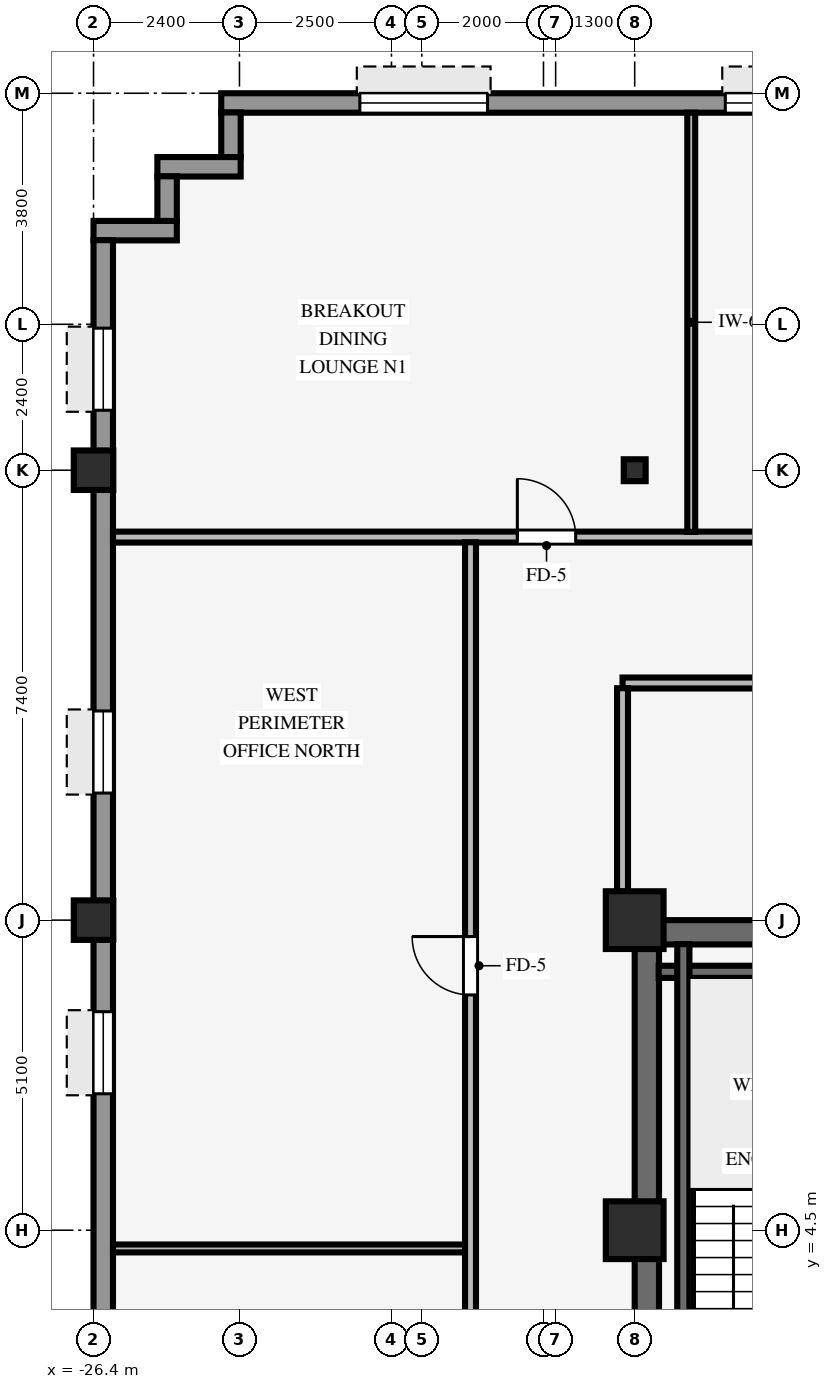
"""IFC4 building model, lengths in metres.
Left out: names, types, materials, properties, quantities, classifications, styles, units other than length and angle.
Written with IfcOpenShell. Run it as: python <this file> out.ifc"""

import sys

from ifc_helpers import new_model, si_unit, direction, frame, frame_2d, origin, origin_2d, place, context, subcontext, project, spatial, rectangle, hollow_rectangle, i_section, extrude, source, transform, mapped, element, fill, save


model = new_model("IFC4")
c1 = context("Model", 3, precision=1e-05, world=origin(), true_north=direction((0.0, 1.0)))
c2 = subcontext(c1, "Body", "Model", "MODEL_VIEW")
j1 = project(units=[si_unit("LENGTHUNIT", "METRE"), si_unit("PLANEANGLEUNIT", "RADIAN")], contexts=[c1])
p1 = place(None, origin())
s1 = spatial("IfcSite", under=j1, at=p1, CompositionType="ELEMENT")
p2 = place(p1, origin())
s2 = spatial("IfcBuilding", under=s1, at=p2, CompositionType="ELEMENT")
p3 = place(p2, frame((0.0, 0.0, 142.1)))
s3 = spatial("IfcBuildingStorey", under=s2, at=p3, CompositionType="ELEMENT", Elevation=142.1)
p4 = place(p3, frame((-17.5, 9.4, 0.0), z_axis=(0.0, 0.0, 1.0), x_axis=(1.0, 0.0, 0.0)))
e1 = element("IfcWall", 1, at=p4, inside=s3, PredefinedType="SHEAR", context=c2, shape_type="SweptSolid", body=[
    extrude(rectangle(XDim=8.5, YDim=0.4, at=frame_2d((4.25, 0.0))), origin(), (0.0, 0.0, 1.0), 3.37),
])
p5 = place(p3, frame((-17.3, -9.205, 0.0), z_axis=(0.0, 0.0, 1.0), x_axis=(0.0, 1.0, 0.0)))
e2 = element("IfcWall", 2, at=p5, inside=s3, PredefinedType="SHEAR", context=c2, shape_type="SweptSolid", body=[
    extrude(rectangle(XDim=18.41, YDim=0.4, at=frame_2d((9.205, 0.0))), origin(), (0.0, 0.0, 1.0), 3.37),
])
for number, where, z_axis, x_axis in (
    (3, (-17.5, 4.5, 0.0), (0.0, 0.0, 1.0), (1.0, 0.0, 0.0)),
    (4, (-17.5, 9.6, 0.0), (0.0, 0.0, 1.0), (1.0, 0.0, 0.0)),
):
    element("IfcColumn", number, at=place(p3, frame(where, z_axis=z_axis, x_axis=x_axis)), inside=s3, PredefinedType="COLUMN", context=c2, shape_type="SweptSolid", body=[
        extrude(rectangle(XDim=0.95, YDim=0.95, at=origin_2d()), origin(), (0.0, 0.0, 1.0), 3.37),
    ])
for number, where, z_axis, x_axis in (
    (5, (-26.4, 9.6, 0.0), (0.0, 0.0, 1.0), (1.0, 0.0, 0.0)),
    (6, (-26.4, 17.0, 0.0), (0.0, 0.0, 1.0), (1.0, 0.0, 0.0)),
):
    element("IfcColumn", number, at=place(p3, frame(where, z_axis=z_axis, x_axis=x_axis)), inside=s3, PredefinedType="COLUMN", context=c2, shape_type="SweptSolid", body=[
        extrude(hollow_rectangle(XDim=0.65, YDim=0.65, WallThickness=0.04, InnerFilletRadius=0.04, OuterFilletRadius=0.08, at=origin_2d()), origin(), (0.0, 0.0, 1.0), 3.37),
    ])
p6 = place(p3, frame((-17.5, 17.0, 0.0), z_axis=(0.0, 0.0, 1.0), x_axis=(1.0, 0.0, 0.0)))
e7 = element("IfcColumn", 7, at=p6, inside=s3, PredefinedType="COLUMN", context=c2, shape_type="SweptSolid", body=[
    extrude(i_section(OverallWidth=0.36, OverallDepth=0.36, WebThickness=0.021, FlangeThickness=0.021, FilletRadius=0.018, at=origin_2d()), origin(), (0.0, 0.0, 1.0), 3.37),
])
p7 = place(p3, frame((-24.3, 23.04, 0.0), z_axis=(0.0, 0.0, 1.0), x_axis=(1.0, 0.0, 0.0)))
e8 = element("IfcWall", 8, at=p7, inside=s3, PredefinedType="STANDARD", context=c2, shape_type="SweptSolid", body=[
    extrude(rectangle(XDim=48.6, YDim=0.32, at=frame_2d((24.3, 0.0))), origin(), (0.0, 0.0, 1.0), 2.705),
])
p8 = place(p7, frame((28.5, 0.0, 0.0)))
e9 = element("IfcOpeningElement", 9, at=p8, cuts=e8, PredefinedType="OPENING", context=c2, shape_type="SweptSolid", body=[
    extrude(rectangle(XDim=1.05, YDim=2.1, at=frame_2d((0.525, 1.05))), frame((0.0, 0.17, 0.0), z_axis=(0.0, -1.0, 0.0), x_axis=(1.0, 0.0, 0.0)), (0.0, 0.0, 1.0), 0.34),
])
p9 = place(p7, frame((2.28, 0.0, 0.8)))
e10 = element("IfcOpeningElement", 10, at=p9, cuts=e8, PredefinedType="OPENING", context=c2, shape_type="SweptSolid", body=[
    extrude(rectangle(XDim=2.1, YDim=1.56, at=frame_2d((1.05, 0.78))), frame((0.0, 0.17, 0.0), z_axis=(0.0, -1.0, 0.0), x_axis=(1.0, 0.0, 0.0)), (0.0, 0.0, 1.0), 0.34),
])
p10 = place(p7, frame((8.29, 0.0, 0.8)))
e11 = element("IfcOpeningElement", 11, at=p10, cuts=e8, PredefinedType="OPENING", context=c2, shape_type="SweptSolid", body=[
    extrude(rectangle(XDim=2.1, YDim=1.56, at=frame_2d((1.05, 0.78))), frame((0.0, 0.17, 0.0), z_axis=(0.0, -1.0, 0.0), x_axis=(1.0, 0.0, 0.0)), (0.0, 0.0, 1.0), 0.34),
])
p11 = place(p7, frame((11.6, 0.0, 0.8)))
e12 = element("IfcOpeningElement", 12, at=p11, cuts=e8, PredefinedType="OPENING", context=c2, shape_type="SweptSolid", body=[
    extrude(rectangle(XDim=2.1, YDim=1.56, at=frame_2d((1.05, 0.78))), frame((0.0, 0.17, 0.0), z_axis=(0.0, -1.0, 0.0), x_axis=(1.0, 0.0, 0.0)), (0.0, 0.0, 1.0), 0.34),
])
p12 = place(p7, frame((16.26, 0.0, 0.8)))
e13 = element("IfcOpeningElement", 13, at=p12, cuts=e8, PredefinedType="OPENING", context=c2, shape_type="SweptSolid", body=[
    extrude(rectangle(XDim=2.1, YDim=1.56, at=frame_2d((1.05, 0.78))), frame((0.0, 0.17, 0.0), z_axis=(0.0, -1.0, 0.0), x_axis=(1.0, 0.0, 0.0)), (0.0, 0.0, 1.0), 0.34),
])
p13 = place(p7, frame((25.58, 0.0, 0.8)))
e14 = element("IfcOpeningElement", 14, at=p13, cuts=e8, PredefinedType="OPENING", context=c2, shape_type="SweptSolid", body=[
    extrude(rectangle(XDim=2.1, YDim=1.56, at=frame_2d((1.05, 0.78))), frame((0.0, 0.17, 0.0), z_axis=(0.0, -1.0, 0.0), x_axis=(1.0, 0.0, 0.0)), (0.0, 0.0, 1.0), 0.34),
])
p14 = place(p7, frame((30.24, 0.0, 0.8)))
e15 = element("IfcOpeningElement", 15, at=p14, cuts=e8, PredefinedType="OPENING", context=c2, shape_type="SweptSolid", body=[
    extrude(rectangle(XDim=2.1, YDim=1.56, at=frame_2d((1.05, 0.78))), frame((0.0, 0.17, 0.0), z_axis=(0.0, -1.0, 0.0), x_axis=(1.0, 0.0, 0.0)), (0.0, 0.0, 1.0), 0.34),
])
p15 = place(p7, frame((34.9, 0.0, 0.8)))
e16 = element("IfcOpeningElement", 16, at=p15, cuts=e8, PredefinedType="OPENING", context=c2, shape_type="SweptSolid", body=[
    extrude(rectangle(XDim=2.1, YDim=1.56, at=frame_2d((1.05, 0.78))), frame((0.0, 0.17, 0.0), z_axis=(0.0, -1.0, 0.0), x_axis=(1.0, 0.0, 0.0)), (0.0, 0.0, 1.0), 0.34),
])
p16 = place(p7, frame((39.56, 0.0, 0.8)))
e17 = element("IfcOpeningElement", 17, at=p16, cuts=e8, PredefinedType="OPENING", context=c2, shape_type="SweptSolid", body=[
    extrude(rectangle(XDim=2.1, YDim=1.56, at=frame_2d((1.05, 0.78))), frame((0.0, 0.17, 0.0), z_axis=(0.0, -1.0, 0.0), x_axis=(1.0, 0.0, 0.0)), (0.0, 0.0, 1.0), 0.34),
])
p17 = place(p7, frame((44.22, 0.0, 0.8)))
e18 = element("IfcOpeningElement", 18, at=p17, cuts=e8, PredefinedType="OPENING", context=c2, shape_type="SweptSolid", body=[
    extrude(rectangle(XDim=2.1, YDim=1.56, at=frame_2d((1.05, 0.78))), frame((0.0, 0.17, 0.0), z_axis=(0.0, -1.0, 0.0), x_axis=(1.0, 0.0, 0.0)), (0.0, 0.0, 1.0), 0.34),
])
p18 = place(p3, frame((-24.14, 22.146, 0.0), z_axis=(0.0, 0.0, 1.0), x_axis=(0.0, 1.0, 0.0)))
e19 = element("IfcWall", 19, at=p18, inside=s3, PredefinedType="STANDARD", context=c2, shape_type="SweptSolid", body=[
    extrude(rectangle(XDim=0.738, YDim=0.32, at=frame_2d((0.369, 0.0))), origin(), (0.0, 0.0, 1.0), 3.36),
])
p19 = place(p3, frame((-25.35, 21.99, 0.0), z_axis=(0.0, 0.0, 1.0), x_axis=(1.0, 0.0, 0.0)))
e20 = element("IfcWall", 20, at=p19, inside=s3, PredefinedType="STANDARD", context=c2, shape_type="SweptSolid", body=[
    extrude(rectangle(XDim=1.37, YDim=0.32, at=frame_2d((0.685, 0.0))), origin(), (0.0, 0.0, 1.0), 3.36),
])
p20 = place(p3, frame((-25.19, 21.096, 0.0), z_axis=(0.0, 0.0, 1.0), x_axis=(0.0, 1.0, 0.0)))
e21 = element("IfcWall", 21, at=p20, inside=s3, PredefinedType="STANDARD", context=c2, shape_type="SweptSolid", body=[
    extrude(rectangle(XDim=0.738, YDim=0.32, at=frame_2d((0.369, 0.0))), origin(), (0.0, 0.0, 1.0), 3.36),
])
p21 = place(p3, frame((-26.4, 20.94, 0.0), z_axis=(0.0, 0.0, 1.0), x_axis=(1.0, 0.0, 0.0)))
e22 = element("IfcWall", 22, at=p21, inside=s3, PredefinedType="STANDARD", context=c2, shape_type="SweptSolid", body=[
    extrude(rectangle(XDim=1.37, YDim=0.32, at=frame_2d((0.685, 0.0))), origin(), (0.0, 0.0, 1.0), 3.36),
])
p22 = place(p3, frame((-26.24, -20.784, 0.0), z_axis=(0.0, 0.0, 1.0), x_axis=(0.0, 1.0, 0.0)))
e23 = element("IfcWall", 23, at=p22, inside=s3, PredefinedType="STANDARD", context=c2, shape_type="SweptSolid", body=[
    extrude(rectangle(XDim=41.568, YDim=0.32, at=frame_2d((20.784, 0.0))), origin(), (0.0, 0.0, 1.0), 2.705),
])
p23 = place(p22, frame((1.448, 0.0, 0.8)))
e24 = element("IfcOpeningElement", 24, at=p23, cuts=e23, PredefinedType="OPENING", context=c2, shape_type="SweptSolid", body=[
    extrude(rectangle(XDim=1.35, YDim=1.56, at=frame_2d((0.675, 0.78))), frame((0.0, 0.17, 0.0), z_axis=(0.0, -1.0, 0.0), x_axis=(1.0, 0.0, 0.0)), (0.0, 0.0, 1.0), 0.34),
])
p24 = place(p22, frame((7.744, 0.0, 0.8)))
e25 = element("IfcOpeningElement", 25, at=p24, cuts=e23, PredefinedType="OPENING", context=c2, shape_type="SweptSolid", body=[
    extrude(rectangle(XDim=1.35, YDim=1.56, at=frame_2d((0.675, 0.78))), frame((0.0, 0.17, 0.0), z_axis=(0.0, -1.0, 0.0), x_axis=(1.0, 0.0, 0.0)), (0.0, 0.0, 1.0), 0.34),
])
p25 = place(p22, frame((12.69, 0.0, 0.8)))
e26 = element("IfcOpeningElement", 26, at=p25, cuts=e23, PredefinedType="OPENING", context=c2, shape_type="SweptSolid", body=[
    extrude(rectangle(XDim=1.35, YDim=1.56, at=frame_2d((0.675, 0.78))), frame((0.0, 0.17, 0.0), z_axis=(0.0, -1.0, 0.0), x_axis=(1.0, 0.0, 0.0)), (0.0, 0.0, 1.0), 0.34),
])
p26 = place(p22, frame((17.636, 0.0, 0.8)))
e27 = element("IfcOpeningElement", 27, at=p26, cuts=e23, PredefinedType="OPENING", context=c2, shape_type="SweptSolid", body=[
    extrude(rectangle(XDim=1.35, YDim=1.56, at=frame_2d((0.675, 0.78))), frame((0.0, 0.17, 0.0), z_axis=(0.0, -1.0, 0.0), x_axis=(1.0, 0.0, 0.0)), (0.0, 0.0, 1.0), 0.34),
])
p27 = place(p22, frame((22.582, 0.0, 0.8)))
e28 = element("IfcOpeningElement", 28, at=p27, cuts=e23, PredefinedType="OPENING", context=c2, shape_type="SweptSolid", body=[
    extrude(rectangle(XDim=1.35, YDim=1.56, at=frame_2d((0.675, 0.78))), frame((0.0, 0.17, 0.0), z_axis=(0.0, -1.0, 0.0), x_axis=(1.0, 0.0, 0.0)), (0.0, 0.0, 1.0), 0.34),
])
p28 = place(p22, frame((27.528, 0.0, 0.8)))
e29 = element("IfcOpeningElement", 29, at=p28, cuts=e23, PredefinedType="OPENING", context=c2, shape_type="SweptSolid", body=[
    extrude(rectangle(XDim=1.35, YDim=1.56, at=frame_2d((0.675, 0.78))), frame((0.0, 0.17, 0.0), z_axis=(0.0, -1.0, 0.0), x_axis=(1.0, 0.0, 0.0)), (0.0, 0.0, 1.0), 0.34),
])
p29 = place(p22, frame((32.474, 0.0, 0.8)))
e30 = element("IfcOpeningElement", 30, at=p29, cuts=e23, PredefinedType="OPENING", context=c2, shape_type="SweptSolid", body=[
    extrude(rectangle(XDim=1.35, YDim=1.56, at=frame_2d((0.675, 0.78))), frame((0.0, 0.17, 0.0), z_axis=(0.0, -1.0, 0.0), x_axis=(1.0, 0.0, 0.0)), (0.0, 0.0, 1.0), 0.34),
])
p30 = place(p22, frame((38.77, 0.0, 0.8)))
e31 = element("IfcOpeningElement", 31, at=p30, cuts=e23, PredefinedType="OPENING", context=c2, shape_type="SweptSolid", body=[
    extrude(rectangle(XDim=1.35, YDim=1.56, at=frame_2d((0.675, 0.78))), frame((0.0, 0.17, 0.0), z_axis=(0.0, -1.0, 0.0), x_axis=(1.0, 0.0, 0.0)), (0.0, 0.0, 1.0), 0.34),
])
p31 = place(p3, frame((-17.105, 8.75, 0.0), z_axis=(0.0, 0.0, 1.0), x_axis=(1.0, 0.0, 0.0)))
e32 = element("IfcWall", 32, at=p31, inside=s3, PredefinedType="SHEAR", context=c2, shape_type="SweptSolid", body=[
    extrude(rectangle(XDim=3.57, YDim=0.2, at=frame_2d((1.785, 0.0))), origin(), (0.0, 0.0, 1.0), 3.37),
])
p32 = place(p3, frame((-16.7, 1.095, 0.0), z_axis=(0.0, 0.0, 1.0), x_axis=(0.0, 1.0, 0.0)))
e33 = element("IfcWall", 33, at=p32, inside=s3, PredefinedType="SHEAR", context=c2, shape_type="SweptSolid", body=[
    extrude(rectangle(XDim=8.11, YDim=0.2, at=frame_2d((4.055, 0.0))), origin(), (0.0, 0.0, 1.0), 3.37),
])
p33 = place(p3, frame((-26.08, 4.2, 0.0), z_axis=(0.0, 0.0, 1.0), x_axis=(1.0, 0.0, 0.0)))
e34 = element("IfcWall", 34, at=p33, inside=s3, PredefinedType="PARTITIONING", context=c2, shape_type="SweptSolid", body=[
    extrude(rectangle(XDim=5.794, YDim=0.13, at=frame_2d((2.897, 0.0))), origin(), (0.0, 0.0, 1.0), 3.36),
])
p34 = place(p3, frame((-17.7, 13.5, 0.0), z_axis=(0.0, 0.0, 1.0), x_axis=(1.0, 0.0, 0.0)))
e35 = element("IfcWall", 35, at=p34, inside=s3, PredefinedType="PARTITIONING", context=c2, shape_type="SweptSolid", body=[
    extrude(rectangle(XDim=24.3, YDim=0.18, at=frame_2d((12.15, 0.0))), origin(), (0.0, 0.0, 1.0), 2.998),
])
p35 = place(p34, frame((4.57, 0.0, 0.0)))
e36 = element("IfcOpeningElement", 36, at=p35, cuts=e35, PredefinedType="OPENING", context=c2, shape_type="SweptSolid", body=[
    extrude(rectangle(XDim=0.96, YDim=2.1, at=frame_2d((0.48, 1.05))), frame((0.0, 0.1, 0.0), z_axis=(0.0, -1.0, 0.0), x_axis=(1.0, 0.0, 0.0)), (0.0, 0.0, 1.0), 0.2),
])
p36 = place(p34, frame((13.72, 0.0, 0.0)))
e37 = element("IfcOpeningElement", 37, at=p36, cuts=e35, PredefinedType="OPENING", context=c2, shape_type="SweptSolid", body=[
    extrude(rectangle(XDim=0.96, YDim=2.1, at=frame_2d((0.48, 1.05))), frame((0.0, 0.1, 0.0), z_axis=(0.0, -1.0, 0.0), x_axis=(1.0, 0.0, 0.0)), (0.0, 0.0, 1.0), 0.2),
])
p37 = place(p34, frame((18.9, 0.0, 0.0)))
e38 = element("IfcOpeningElement", 38, at=p37, cuts=e35, PredefinedType="OPENING", context=c2, shape_type="SweptSolid", body=[
    extrude(rectangle(XDim=0.9, YDim=2.1, at=frame_2d((0.45, 1.05))), frame((0.0, 0.1, 0.0), z_axis=(0.0, -1.0, 0.0), x_axis=(1.0, 0.0, 0.0)), (0.0, 0.0, 1.0), 0.2),
])
p38 = place(p34, frame((21.0, 0.0, 0.0)))
e39 = element("IfcOpeningElement", 39, at=p38, cuts=e35, PredefinedType="OPENING", context=c2, shape_type="SweptSolid", body=[
    extrude(rectangle(XDim=0.9, YDim=2.1, at=frame_2d((0.45, 1.05))), frame((0.0, 0.1, 0.0), z_axis=(0.0, -1.0, 0.0), x_axis=(1.0, 0.0, 0.0)), (0.0, 0.0, 1.0), 0.2),
])
p39 = place(p3, frame((-26.08, 15.9, 0.0), z_axis=(0.0, 0.0, 1.0), x_axis=(1.0, 0.0, 0.0)))
e40 = element("IfcWall", 40, at=p39, inside=s3, PredefinedType="PARTITIONING", context=c2, shape_type="SweptSolid", body=[
    extrude(rectangle(XDim=52.16, YDim=0.18, at=frame_2d((26.08, 0.0))), origin(), (0.0, 0.0, 1.0), 3.36),
])
p40 = place(p39, frame((15.55, 0.0, 0.0)))
e41 = element("IfcOpeningElement", 41, at=p40, cuts=e40, PredefinedType="OPENING", context=c2, shape_type="SweptSolid", body=[
    extrude(rectangle(XDim=0.96, YDim=2.1, at=frame_2d((0.48, 1.05))), frame((0.0, 0.1, 0.0), z_axis=(0.0, -1.0, 0.0), x_axis=(1.0, 0.0, 0.0)), (0.0, 0.0, 1.0), 0.2),
])
p41 = place(p39, frame((40.5, 0.0, 0.0)))
e42 = element("IfcOpeningElement", 42, at=p41, cuts=e40, PredefinedType="OPENING", context=c2, shape_type="SweptSolid", body=[
    extrude(rectangle(XDim=0.96, YDim=2.1, at=frame_2d((0.48, 1.05))), frame((0.0, 0.1, 0.0), z_axis=(0.0, -1.0, 0.0), x_axis=(1.0, 0.0, 0.0)), (0.0, 0.0, 1.0), 0.2),
])
p42 = place(p39, frame((6.65, 0.0, 0.0)))
e43 = element("IfcOpeningElement", 43, at=p42, cuts=e40, PredefinedType="OPENING", context=c2, shape_type="SweptSolid", body=[
    extrude(rectangle(XDim=0.96, YDim=2.1, at=frame_2d((0.48, 1.05))), frame((0.0, 0.1, 0.0), z_axis=(0.0, -1.0, 0.0), x_axis=(1.0, 0.0, 0.0)), (0.0, 0.0, 1.0), 0.2),
])
p43 = place(p3, frame((-20.2, -15.814, 0.0), z_axis=(0.0, 0.0, 1.0), x_axis=(0.0, 1.0, 0.0)))
e44 = element("IfcWall", 44, at=p43, inside=s3, PredefinedType="PARTITIONING", context=c2, shape_type="SweptSolid", body=[
    extrude(rectangle(XDim=31.628, YDim=0.18, at=frame_2d((15.814, 0.0))), origin(), (0.0, 0.0, 1.0), 3.36),
])
p44 = place(p43, frame((10.684, 0.0, 0.0)))
e45 = element("IfcOpeningElement", 45, at=p44, cuts=e44, PredefinedType="OPENING", context=c2, shape_type="SweptSolid", body=[
    extrude(rectangle(XDim=0.96, YDim=2.1, at=frame_2d((0.48, 1.05))), frame((0.0, 0.1, 0.0), z_axis=(0.0, -1.0, 0.0), x_axis=(1.0, 0.0, 0.0)), (0.0, 0.0, 1.0), 0.2),
])
p45 = place(p43, frame((24.184, 0.0, 0.0)))
e46 = element("IfcOpeningElement", 46, at=p45, cuts=e44, PredefinedType="OPENING", context=c2, shape_type="SweptSolid", body=[
    extrude(rectangle(XDim=0.96, YDim=2.1, at=frame_2d((0.48, 1.05))), frame((0.0, 0.1, 0.0), z_axis=(0.0, -1.0, 0.0), x_axis=(1.0, 0.0, 0.0)), (0.0, 0.0, 1.0), 0.2),
])
p46 = place(p3, frame((-17.7, 10.071, 0.0), z_axis=(0.0, 0.0, 1.0), x_axis=(0.0, 1.0, 0.0)))
e47 = element("IfcWall", 47, at=p46, inside=s3, PredefinedType="PARTITIONING", context=c2, shape_type="SweptSolid", body=[
    extrude(rectangle(XDim=3.343, YDim=0.18, at=frame_2d((1.671, 0.0))), origin(), (0.0, 0.0, 1.0), 2.816),
])
p47 = place(p3, frame((-16.57, 15.986, 0.0), z_axis=(0.0, 0.0, 1.0), x_axis=(0.0, 1.0, 0.0)))
e48 = element("IfcWall", 48, at=p47, inside=s3, PredefinedType="PARTITIONING", context=c2, shape_type="SweptSolid", body=[
    extrude(rectangle(XDim=6.894, YDim=0.13, at=frame_2d((3.447, 0.0))), origin(), (0.0, 0.0, 1.0), 3.36),
])
m1 = source(origin(), c2, "Body", "SweptSolid", [
    extrude(rectangle(XDim=2.1, YDim=1.56, at=frame_2d((1.05, 0.78))), frame((0.0, 0.03, 0.0), z_axis=(0.0, -1.0, 0.0), x_axis=(1.0, 0.0, 0.0)), (0.0, 0.0, 1.0), 0.06),
])
p48 = place(p9, origin())
e49 = element("IfcWindow", 49, at=p48, inside=s3, PartitioningType="SINGLE_PANEL", PredefinedType="WINDOW", context=c2, shape_type="MappedRepresentation", body=[
    mapped(m1, transform((0.0, 0.0, 0.0), scale=1.0)),
])
fill(e10, e49)
p49 = place(p10, origin())
e50 = element("IfcWindow", 50, at=p49, inside=s3, PartitioningType="SINGLE_PANEL", PredefinedType="WINDOW", context=c2, shape_type="MappedRepresentation", body=[
    mapped(m1, transform((0.0, 0.0, 0.0), scale=1.0)),
])
fill(e11, e50)
m2 = source(origin(), c2, "Body", "SweptSolid", [
    extrude(rectangle(XDim=1.35, YDim=1.56, at=frame_2d((0.675, 0.78))), frame((0.0, 0.03, 0.0), z_axis=(0.0, -1.0, 0.0), x_axis=(1.0, 0.0, 0.0)), (0.0, 0.0, 1.0), 0.06),
])
p50 = place(p28, origin())
e51 = element("IfcWindow", 51, at=p50, inside=s3, PartitioningType="SINGLE_PANEL", PredefinedType="WINDOW", context=c2, shape_type="MappedRepresentation", body=[
    mapped(m2, transform((0.0, 0.0, 0.0), scale=1.0)),
])
fill(e29, e51)
p51 = place(p29, origin())
e52 = element("IfcWindow", 52, at=p51, inside=s3, PartitioningType="SINGLE_PANEL", PredefinedType="WINDOW", context=c2, shape_type="MappedRepresentation", body=[
    mapped(m2, transform((0.0, 0.0, 0.0), scale=1.0)),
])
fill(e30, e52)
p52 = place(p30, origin())
e53 = element("IfcWindow", 53, at=p52, inside=s3, PartitioningType="SINGLE_PANEL", PredefinedType="WINDOW", context=c2, shape_type="MappedRepresentation", body=[
    mapped(m2, transform((0.0, 0.0, 0.0), scale=1.0)),
])
fill(e31, e53)
m3 = source(origin(), c2, "Body", "SweptSolid", [
    extrude(rectangle(XDim=0.96, YDim=2.1, at=frame_2d((0.48, 1.05))), frame((0.0, 0.025, 0.0), z_axis=(0.0, -1.0, 0.0), x_axis=(1.0, 0.0, 0.0)), (0.0, 0.0, 1.0), 0.05),
])
p53 = place(p45, origin())
e54 = element("IfcDoor", 54, at=p53, inside=s3, OperationType="SINGLE_SWING_RIGHT", PredefinedType="DOOR", context=c2, shape_type="MappedRepresentation", body=[
    mapped(m3, transform((0.0, 0.0, 0.0), scale=1.0)),
])
fill(e46, e54)
p54 = place(p42, origin())
e55 = element("IfcDoor", 55, at=p54, inside=s3, OperationType="SINGLE_SWING_LEFT", PredefinedType="DOOR", context=c2, shape_type="MappedRepresentation", body=[
    mapped(m3, transform((0.0, 0.0, 0.0), scale=1.0)),
])
fill(e43, e55)
save(model, sys.argv[1])
